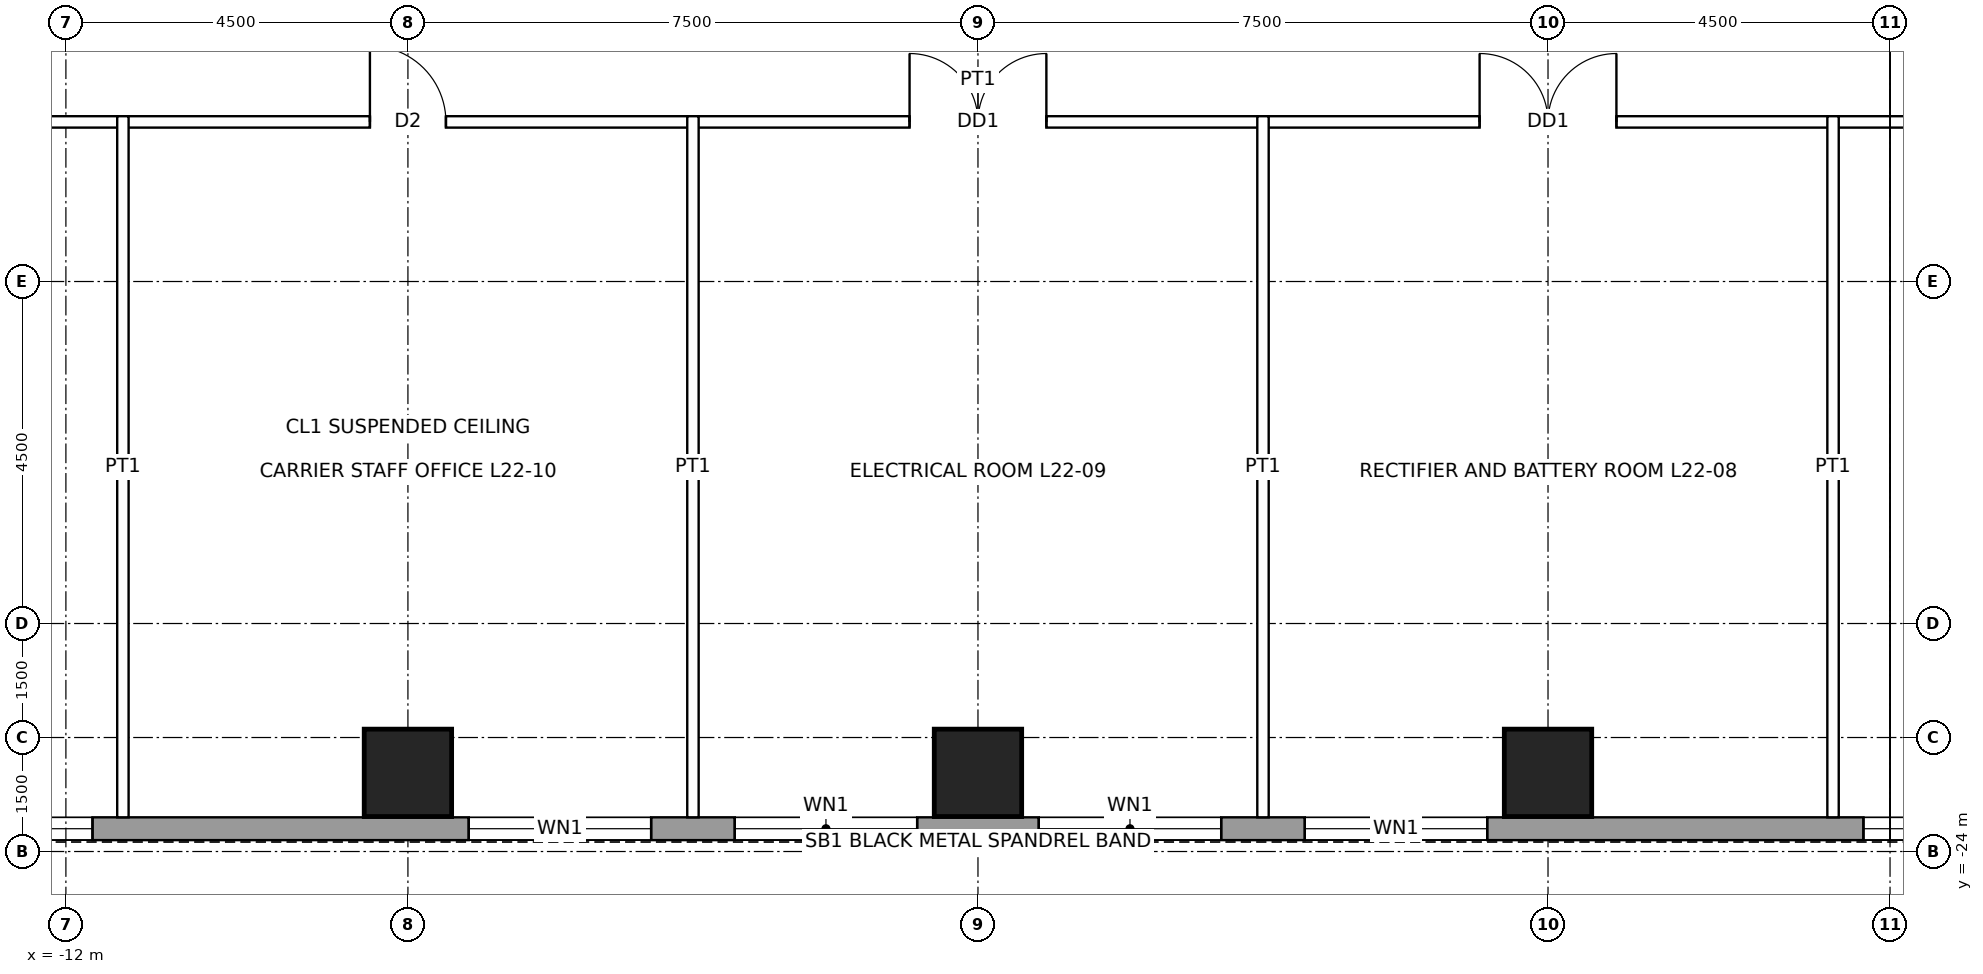
"""IFC4 building model, lengths in metres.
Left out: names, types, materials, properties, quantities, classifications, styles, units other than length and angle.
Written with IfcOpenShell. Run it as: python <this file> out.ifc"""

import sys

from ifc_helpers import new_model, si_unit, direction, frame, frame_2d, origin, origin_2d, place, context, subcontext, project, spatial, rectangle, hollow_rectangle, extrude, element, fill, save


model = new_model("IFC4")
c1 = context("Model", 3, precision=1e-05, world=origin(), true_north=direction((0.0, 1.0)))
c2 = subcontext(c1, "Body", "Model", "MODEL_VIEW")
j1 = project(units=[si_unit("LENGTHUNIT", "METRE"), si_unit("PLANEANGLEUNIT", "RADIAN")], contexts=[c1])
p1 = place(None, origin())
s1 = spatial("IfcSite", under=j1, at=p1, CompositionType="ELEMENT")
p2 = place(p1, origin())
s2 = spatial("IfcBuilding", under=s1, at=p2, CompositionType="ELEMENT")
p3 = place(p2, frame((0.0, 0.0, 113.4)))
s3 = spatial("IfcBuildingStorey", under=s2, at=p3, CompositionType="ELEMENT", Elevation=113.4)
for number, where, z_axis, x_axis in (
    (1, (7.5, -22.965, 0.0), (0.0, 0.0, 1.0), (1.0, 0.0, 0.0)),
    (2, (0.0, -22.965, 0.0), (0.0, 0.0, 1.0), (1.0, 0.0, 0.0)),
    (3, (-7.5, -22.965, 0.0), (0.0, 0.0, 1.0), (1.0, 0.0, 0.0)),
):
    element("IfcColumn", number, at=place(p3, frame(where, z_axis=z_axis, x_axis=x_axis)), inside=s3, PredefinedType="COLUMN", context=c2, shape_type="SweptSolid", body=[
        extrude(hollow_rectangle(XDim=1.15, YDim=1.15, WallThickness=0.075, at=origin_2d()), origin(), (0.0, 0.0, 1.0), 4.5),
    ])
p4 = place(p3, frame((16.2, -23.7, 0.0), z_axis=(0.0, 0.0, 1.0), x_axis=(-1.0, 0.0, 0.0)))
e4 = element("IfcWall", 4, at=p4, inside=s3, PredefinedType="SOLIDWALL", context=c2, shape_type="SweptSolid", body=[
    extrude(rectangle(XDim=32.4, YDim=0.3, at=frame_2d((16.2, 0.0))), origin(), (0.0, 0.0, 1.0), 4.3),
])
p5 = place(p4, frame((0.65, 0.0, 1.0)))
e5 = element("IfcOpeningElement", 5, at=p5, cuts=e4, PredefinedType="OPENING", context=c2, shape_type="SweptSolid", body=[
    extrude(rectangle(XDim=1.8, YDim=1.2, at=frame_2d((0.9, 0.6))), frame((0.0, 0.16, 0.0), z_axis=(0.0, -1.0, 0.0), x_axis=(1.0, 0.0, 0.0)), (0.0, 0.0, 1.0), 0.32),
])
p6 = place(p4, frame((2.75, 0.0, 1.0)))
e6 = element("IfcOpeningElement", 6, at=p6, cuts=e4, PredefinedType="OPENING", context=c2, shape_type="SweptSolid", body=[
    extrude(rectangle(XDim=1.8, YDim=1.2, at=frame_2d((0.9, 0.6))), frame((0.0, 0.16, 0.0), z_axis=(0.0, -1.0, 0.0), x_axis=(1.0, 0.0, 0.0)), (0.0, 0.0, 1.0), 0.32),
])
p7 = place(p4, frame((9.5, 0.0, 1.0)))
e7 = element("IfcOpeningElement", 7, at=p7, cuts=e4, PredefinedType="OPENING", context=c2, shape_type="SweptSolid", body=[
    extrude(rectangle(XDim=2.4, YDim=1.2, at=frame_2d((1.2, 0.6))), frame((0.0, 0.16, 0.0), z_axis=(0.0, -1.0, 0.0), x_axis=(1.0, 0.0, 0.0)), (0.0, 0.0, 1.0), 0.32),
])
p8 = place(p4, frame((13.0, 0.0, 1.0)))
e8 = element("IfcOpeningElement", 8, at=p8, cuts=e4, PredefinedType="OPENING", context=c2, shape_type="SweptSolid", body=[
    extrude(rectangle(XDim=2.4, YDim=1.2, at=frame_2d((1.2, 0.6))), frame((0.0, 0.16, 0.0), z_axis=(0.0, -1.0, 0.0), x_axis=(1.0, 0.0, 0.0)), (0.0, 0.0, 1.0), 0.32),
])
p9 = place(p4, frame((17.0, 0.0, 1.0)))
e9 = element("IfcOpeningElement", 9, at=p9, cuts=e4, PredefinedType="OPENING", context=c2, shape_type="SweptSolid", body=[
    extrude(rectangle(XDim=2.4, YDim=1.2, at=frame_2d((1.2, 0.6))), frame((0.0, 0.16, 0.0), z_axis=(0.0, -1.0, 0.0), x_axis=(1.0, 0.0, 0.0)), (0.0, 0.0, 1.0), 0.32),
])
p10 = place(p4, frame((20.5, 0.0, 1.0)))
e10 = element("IfcOpeningElement", 10, at=p10, cuts=e4, PredefinedType="OPENING", context=c2, shape_type="SweptSolid", body=[
    extrude(rectangle(XDim=2.4, YDim=1.2, at=frame_2d((1.2, 0.6))), frame((0.0, 0.16, 0.0), z_axis=(0.0, -1.0, 0.0), x_axis=(1.0, 0.0, 0.0)), (0.0, 0.0, 1.0), 0.32),
])
p11 = place(p4, frame((27.85, 0.0, 1.0)))
e11 = element("IfcOpeningElement", 11, at=p11, cuts=e4, PredefinedType="OPENING", context=c2, shape_type="SweptSolid", body=[
    extrude(rectangle(XDim=1.8, YDim=1.2, at=frame_2d((0.9, 0.6))), frame((0.0, 0.16, 0.0), z_axis=(0.0, -1.0, 0.0), x_axis=(1.0, 0.0, 0.0)), (0.0, 0.0, 1.0), 0.32),
])
p12 = place(p4, frame((29.95, 0.0, 1.0)))
e12 = element("IfcOpeningElement", 12, at=p12, cuts=e4, PredefinedType="OPENING", context=c2, shape_type="SweptSolid", body=[
    extrude(rectangle(XDim=1.8, YDim=1.2, at=frame_2d((0.9, 0.6))), frame((0.0, 0.16, 0.0), z_axis=(0.0, -1.0, 0.0), x_axis=(1.0, 0.0, 0.0)), (0.0, 0.0, 1.0), 0.32),
])
p13 = place(p3, frame((-14.475, -14.4, 0.0), z_axis=(0.0, 0.0, 1.0), x_axis=(1.0, 0.0, 0.0)))
e13 = element("IfcWall", 13, at=p13, inside=s3, PredefinedType="PARTITIONING", context=c2, shape_type="SweptSolid", body=[
    extrude(rectangle(XDim=28.95, YDim=0.15, at=frame_2d((14.475, 0.0))), origin(), (0.0, 0.0, 1.0), 4.3),
])
p14 = place(p13, frame((21.075, 0.0, 0.0)))
e14 = element("IfcOpeningElement", 14, at=p14, cuts=e13, PredefinedType="OPENING", context=c2, shape_type="SweptSolid", body=[
    extrude(rectangle(XDim=1.8, YDim=2.4, at=frame_2d((0.9, 1.2))), frame((0.0, 0.085, 0.0), z_axis=(0.0, -1.0, 0.0), x_axis=(1.0, 0.0, 0.0)), (0.0, 0.0, 1.0), 0.17),
])
p15 = place(p13, frame((13.575, 0.0, 0.0)))
e15 = element("IfcOpeningElement", 15, at=p15, cuts=e13, PredefinedType="OPENING", context=c2, shape_type="SweptSolid", body=[
    extrude(rectangle(XDim=1.8, YDim=2.4, at=frame_2d((0.9, 1.2))), frame((0.0, 0.085, 0.0), z_axis=(0.0, -1.0, 0.0), x_axis=(1.0, 0.0, 0.0)), (0.0, 0.0, 1.0), 0.17),
])
p16 = place(p13, frame((6.475, 0.0, 0.0)))
e16 = element("IfcOpeningElement", 16, at=p16, cuts=e13, PredefinedType="OPENING", context=c2, shape_type="SweptSolid", body=[
    extrude(rectangle(XDim=1.0, YDim=2.1, at=frame_2d((0.5, 1.05))), frame((0.0, 0.085, 0.0), z_axis=(0.0, -1.0, 0.0), x_axis=(1.0, 0.0, 0.0)), (0.0, 0.0, 1.0), 0.17),
])
p17 = place(p13, frame((26.8, 0.0, 0.0)))
e17 = element("IfcOpeningElement", 17, at=p17, cuts=e13, PredefinedType="OPENING", context=c2, shape_type="SweptSolid", body=[
    extrude(rectangle(XDim=1.0, YDim=2.1, at=frame_2d((0.5, 1.05))), frame((0.0, 0.085, 0.0), z_axis=(0.0, -1.0, 0.0), x_axis=(1.0, 0.0, 0.0)), (0.0, 0.0, 1.0), 0.17),
])
p18 = place(p13, frame((1.15, 0.0, 0.0)))
e18 = element("IfcOpeningElement", 18, at=p18, cuts=e13, PredefinedType="OPENING", context=c2, shape_type="SweptSolid", body=[
    extrude(rectangle(XDim=1.0, YDim=2.1, at=frame_2d((0.5, 1.05))), frame((0.0, 0.085, 0.0), z_axis=(0.0, -1.0, 0.0), x_axis=(1.0, 0.0, 0.0)), (0.0, 0.0, 1.0), 0.17),
])
for number, where, z_axis, x_axis in (
    (19, (-11.25, -23.55, 0.0), (0.0, 0.0, 1.0), (0.0, 1.0, 0.0)),
    (20, (-3.75, -23.55, 0.0), (0.0, 0.0, 1.0), (0.0, 1.0, 0.0)),
    (21, (3.75, -23.55, 0.0), (0.0, 0.0, 1.0), (0.0, 1.0, 0.0)),
    (22, (11.25, -23.55, 0.0), (0.0, 0.0, 1.0), (0.0, 1.0, 0.0)),
):
    element("IfcWall", number, at=place(p3, frame(where, z_axis=z_axis, x_axis=x_axis)), inside=s3, PredefinedType="PARTITIONING", context=c2, shape_type="SweptSolid", body=[
        extrude(rectangle(XDim=9.225, YDim=0.15, at=frame_2d((4.613, 0.0))), origin(), (0.0, 0.0, 1.0), 3.431),
    ])
p19 = place(p6, origin())
e23 = element("IfcWindow", 23, at=p19, inside=s3, PartitioningType="SINGLE_PANEL", PredefinedType="WINDOW", context=c2, shape_type="SweptSolid", body=[
    extrude(rectangle(XDim=1.8, YDim=1.2, at=frame_2d((0.9, 0.6))), frame((0.0, 0.03, 0.0), z_axis=(0.0, -1.0, 0.0), x_axis=(1.0, 0.0, 0.0)), (0.0, 0.0, 1.0), 0.06),
])
fill(e6, e23)
p20 = place(p7, origin())
e24 = element("IfcWindow", 24, at=p20, inside=s3, PartitioningType="SINGLE_PANEL", PredefinedType="WINDOW", context=c2, shape_type="SweptSolid", body=[
    extrude(rectangle(XDim=2.4, YDim=1.2, at=frame_2d((1.2, 0.6))), frame((0.0, 0.03, 0.0), z_axis=(0.0, -1.0, 0.0), x_axis=(1.0, 0.0, 0.0)), (0.0, 0.0, 1.0), 0.06),
])
fill(e7, e24)
p21 = place(p8, origin())
e25 = element("IfcWindow", 25, at=p21, inside=s3, PartitioningType="SINGLE_PANEL", PredefinedType="WINDOW", context=c2, shape_type="SweptSolid", body=[
    extrude(rectangle(XDim=2.4, YDim=1.2, at=frame_2d((1.2, 0.6))), frame((0.0, 0.03, 0.0), z_axis=(0.0, -1.0, 0.0), x_axis=(1.0, 0.0, 0.0)), (0.0, 0.0, 1.0), 0.06),
])
fill(e8, e25)
p22 = place(p9, origin())
e26 = element("IfcWindow", 26, at=p22, inside=s3, PartitioningType="SINGLE_PANEL", PredefinedType="WINDOW", context=c2, shape_type="SweptSolid", body=[
    extrude(rectangle(XDim=2.4, YDim=1.2, at=frame_2d((1.2, 0.6))), frame((0.0, 0.03, 0.0), z_axis=(0.0, -1.0, 0.0), x_axis=(1.0, 0.0, 0.0)), (0.0, 0.0, 1.0), 0.06),
])
fill(e9, e26)
p23 = place(p10, origin())
e27 = element("IfcWindow", 27, at=p23, inside=s3, PartitioningType="SINGLE_PANEL", PredefinedType="WINDOW", context=c2, shape_type="SweptSolid", body=[
    extrude(rectangle(XDim=2.4, YDim=1.2, at=frame_2d((1.2, 0.6))), frame((0.0, 0.03, 0.0), z_axis=(0.0, -1.0, 0.0), x_axis=(1.0, 0.0, 0.0)), (0.0, 0.0, 1.0), 0.06),
])
fill(e10, e27)
p24 = place(p11, origin())
e28 = element("IfcWindow", 28, at=p24, inside=s3, PartitioningType="SINGLE_PANEL", PredefinedType="WINDOW", context=c2, shape_type="SweptSolid", body=[
    extrude(rectangle(XDim=1.8, YDim=1.2, at=frame_2d((0.9, 0.6))), frame((0.0, 0.03, 0.0), z_axis=(0.0, -1.0, 0.0), x_axis=(1.0, 0.0, 0.0)), (0.0, 0.0, 1.0), 0.06),
])
fill(e11, e28)
p25 = place(p14, origin())
e29 = element("IfcDoor", 29, at=p25, inside=s3, OperationType="DOUBLE_DOOR_SINGLE_SWING", PredefinedType="DOOR", context=c2, shape_type="SweptSolid", body=[
    extrude(rectangle(XDim=1.8, YDim=2.4, at=frame_2d((0.9, 1.2))), frame((0.0, 0.025, 0.0), z_axis=(0.0, -1.0, 0.0), x_axis=(1.0, 0.0, 0.0)), (0.0, 0.0, 1.0), 0.05),
])
fill(e14, e29)
p26 = place(p15, origin())
e30 = element("IfcDoor", 30, at=p26, inside=s3, OperationType="DOUBLE_DOOR_SINGLE_SWING", PredefinedType="DOOR", context=c2, shape_type="SweptSolid", body=[
    extrude(rectangle(XDim=1.8, YDim=2.4, at=frame_2d((0.9, 1.2))), frame((0.0, 0.025, 0.0), z_axis=(0.0, -1.0, 0.0), x_axis=(1.0, 0.0, 0.0)), (0.0, 0.0, 1.0), 0.05),
])
fill(e15, e30)
p27 = place(p16, origin())
e31 = element("IfcDoor", 31, at=p27, inside=s3, OperationType="SINGLE_SWING_LEFT", PredefinedType="DOOR", context=c2, shape_type="SweptSolid", body=[
    extrude(rectangle(XDim=1.0, YDim=2.1, at=frame_2d((0.5, 1.05))), frame((0.0, 0.025, 0.0), z_axis=(0.0, -1.0, 0.0), x_axis=(1.0, 0.0, 0.0)), (0.0, 0.0, 1.0), 0.05),
])
fill(e16, e31)
save(model, sys.argv[1])
